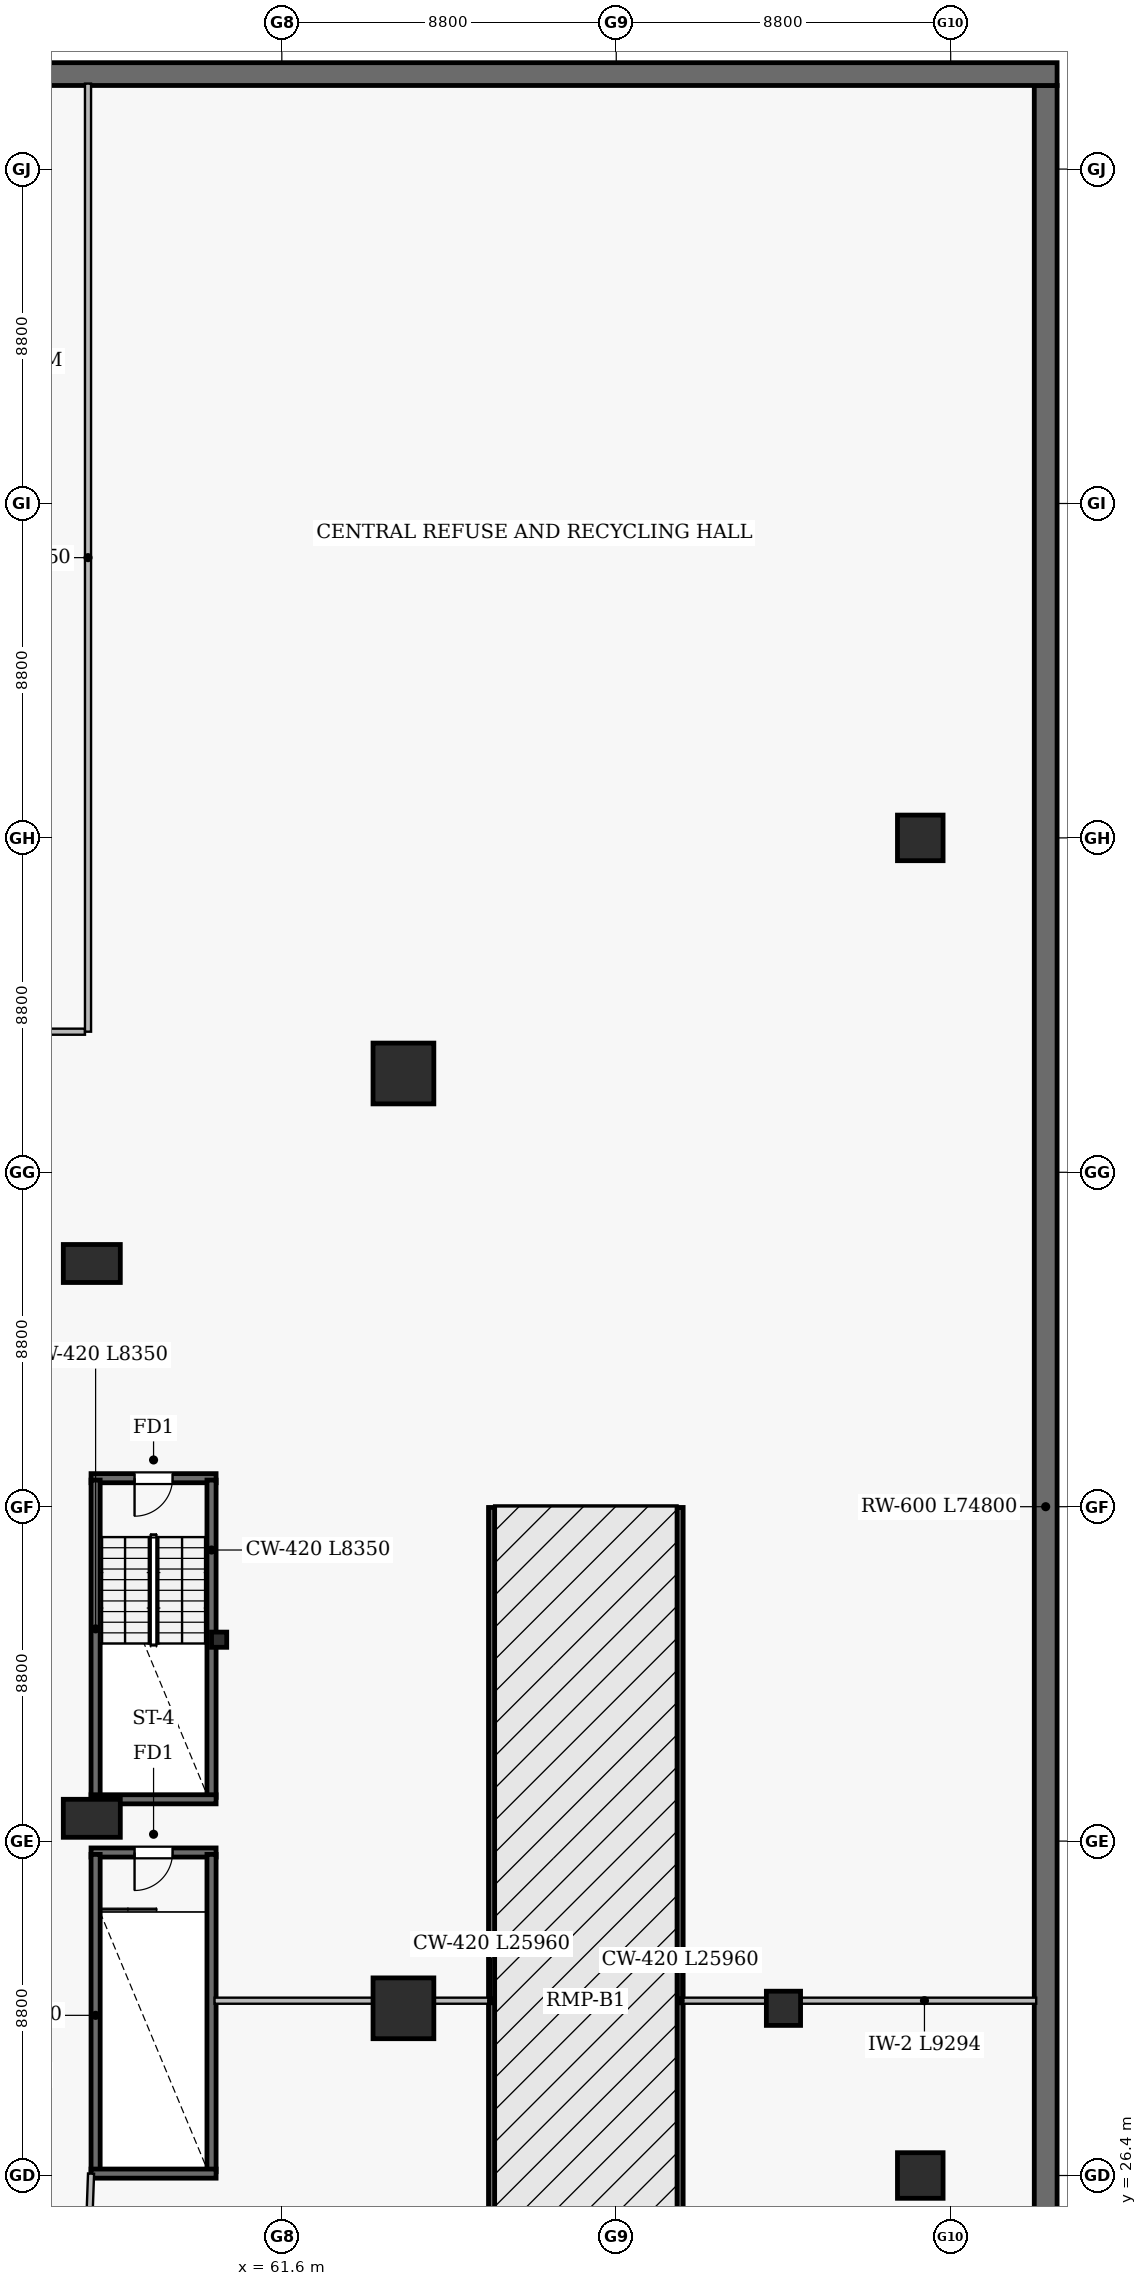
"""IFC4 building model, lengths in metres.
Left out: names, types, materials, properties, quantities, classifications, styles, units other than length and angle.
Written with IfcOpenShell. Run it as: python <this file> out.ifc"""

import sys

from ifc_helpers import new_model, si_unit, direction, frame, frame_2d, origin, origin_2d, place, context, subcontext, project, spatial, rectangle, i_section, extrude, element, fill, save


model = new_model("IFC4")
c1 = context("Model", 3, precision=1e-05, world=origin(), true_north=direction((0.0, 1.0)))
c2 = subcontext(c1, "Body", "Model", "MODEL_VIEW")
j1 = project(units=[si_unit("LENGTHUNIT", "METRE"), si_unit("PLANEANGLEUNIT", "RADIAN")], contexts=[c1])
p1 = place(None, origin())
s1 = spatial("IfcSite", under=j1, at=p1, CompositionType="ELEMENT")
p2 = place(p1, origin())
s2 = spatial("IfcBuilding", under=s1, at=p2, CompositionType="ELEMENT")
p3 = place(p2, frame((0.0, 0.0, -3.9)))
s3 = spatial("IfcBuildingStorey", under=s2, at=p3, CompositionType="ELEMENT", Elevation=-3.9)
for number, where, z_axis, x_axis in (
    (1, (67.12, 18.02, 0.0), (0.0, 0.0, 1.0), (0.0, 1.0, 0.0)),
    (2, (72.08, 18.02, 0.0), (0.0, 0.0, 1.0), (0.0, 1.0, 0.0)),
):
    element("IfcWall", number, at=place(p3, frame(where, z_axis=z_axis, x_axis=x_axis)), inside=s3, PredefinedType="SHEAR", context=c2, shape_type="SweptSolid", body=[
        extrude(rectangle(XDim=25.96, YDim=0.16, at=frame_2d((12.98, 0.0))), origin(), (0.0, 0.0, 1.0), 3.9),
    ])
p4 = place(p3, frame((81.7, 6.6, 0.0), z_axis=(0.0, 0.0, 1.0), x_axis=(0.0, 1.0, 0.0)))
e3 = element("IfcWall", 3, at=p4, inside=s3, PredefinedType="SOLIDWALL", context=c2, shape_type="SweptSolid", body=[
    extrude(rectangle(XDim=74.8, YDim=0.6, at=frame_2d((37.4, 0.0))), origin(), (0.0, 0.0, 1.0), 3.6),
])
p5 = place(p3, frame((82.0, 81.7, 0.0), z_axis=(0.0, 0.0, 1.0), x_axis=(-1.0, 0.0, 0.0)))
e4 = element("IfcWall", 4, at=p5, inside=s3, PredefinedType="SOLIDWALL", context=c2, shape_type="SweptSolid", body=[
    extrude(rectangle(XDim=76.0, YDim=0.6, at=frame_2d((38.0, 0.0))), origin(), (0.0, 0.0, 1.0), 3.6),
])
for number, where, z_axis, x_axis in (
    (5, (56.6, 50.4, 0.0), (0.0, 0.0, 1.0), (1.0, 0.0, 0.0)),
    (6, (56.6, 35.8, 0.0), (0.0, 0.0, 1.0), (1.0, 0.0, 0.0)),
):
    element("IfcColumn", number, at=place(p3, frame(where, z_axis=z_axis, x_axis=x_axis)), inside=s3, PredefinedType="COLUMN", context=c2, shape_type="SweptSolid", body=[
        extrude(rectangle(XDim=1.5, YDim=1.0, at=origin_2d()), origin(), (0.0, 0.0, 1.0), 3.9),
    ])
for number, where, z_axis, x_axis in (
    (7, (64.8, 55.4, 0.0), (0.0, 0.0, 1.0), (1.0, 0.0, 0.0)),
    (8, (64.8, 30.8, 0.0), (0.0, 0.0, 1.0), (1.0, 0.0, 0.0)),
):
    element("IfcColumn", number, at=place(p3, frame(where, z_axis=z_axis, x_axis=x_axis)), inside=s3, PredefinedType="COLUMN", context=c2, shape_type="SweptSolid", body=[
        extrude(rectangle(XDim=1.6, YDim=1.6, at=origin_2d()), origin(), (0.0, 0.0, 1.0), 3.9),
    ])
p6 = place(p3, frame((74.8, 30.8, 0.0), z_axis=(0.0, 0.0, 1.0), x_axis=(1.0, 0.0, 0.0)))
e9 = element("IfcColumn", 9, at=p6, inside=s3, PredefinedType="COLUMN", context=c2, shape_type="SweptSolid", body=[
    extrude(rectangle(XDim=0.9, YDim=0.9, at=origin_2d()), origin(), (0.0, 0.0, 1.0), 3.9),
])
p7 = place(p3, frame((59.95, 40.5, 0.0), z_axis=(0.0, 0.0, 1.0), x_axis=(1.0, 0.0, 0.0)))
e10 = element("IfcColumn", 10, at=p7, inside=s3, PredefinedType="PILASTER", context=c2, shape_type="SweptSolid", body=[
    extrude(i_section(OverallWidth=0.4, OverallDepth=0.4, WebThickness=0.013, FlangeThickness=0.021, FilletRadius=0.022, at=origin_2d()), origin(), (0.0, 0.0, 1.0), 3.9),
])
for number, where, z_axis, x_axis in (
    (11, (78.4, 26.4, 0.0), (0.0, 0.0, 1.0), (1.0, 0.0, 0.0)),
    (12, (78.4, 61.6, 0.0), (0.0, 0.0, 1.0), (1.0, 0.0, 0.0)),
):
    element("IfcColumn", number, at=place(p3, frame(where, z_axis=z_axis, x_axis=x_axis)), inside=s3, PredefinedType="COLUMN", context=c2, shape_type="SweptSolid", body=[
        extrude(rectangle(XDim=1.2, YDim=1.2, at=origin_2d()), origin(), (0.0, 0.0, 1.0), 3.9),
    ])
p8 = place(p3, frame((56.58, 44.75, 0.0), z_axis=(0.0, 0.0, 1.0), x_axis=(1.0, 0.0, 0.0)))
e13 = element("IfcWall", 13, at=p8, inside=s3, PredefinedType="SHEAR", context=c2, shape_type="SweptSolid", body=[
    extrude(rectangle(XDim=3.29, YDim=0.24, at=frame_2d((1.645, 0.0))), origin(), (0.0, 0.0, 1.0), 3.6),
])
p9 = place(p8, frame((1.145, 0.0, 0.0)))
e14 = element("IfcOpeningElement", 14, at=p9, cuts=e13, PredefinedType="OPENING", context=c2, shape_type="SweptSolid", body=[
    extrude(rectangle(XDim=1.0, YDim=2.15, at=frame_2d((0.5, 1.075))), frame((0.0, 0.13, 0.0), z_axis=(0.0, -1.0, 0.0), x_axis=(1.0, 0.0, 0.0)), (0.0, 0.0, 1.0), 0.26),
])
p10 = place(p3, frame((56.58, 34.9, 0.0), z_axis=(0.0, 0.0, 1.0), x_axis=(1.0, 0.0, 0.0)))
e15 = element("IfcWall", 15, at=p10, inside=s3, PredefinedType="SHEAR", context=c2, shape_type="SweptSolid", body=[
    extrude(rectangle(XDim=3.29, YDim=0.24, at=frame_2d((1.645, 0.0))), origin(), (0.0, 0.0, 1.0), 3.6),
])
p11 = place(p10, frame((1.145, 0.0, 0.0)))
e16 = element("IfcOpeningElement", 16, at=p11, cuts=e15, PredefinedType="OPENING", context=c2, shape_type="SweptSolid", body=[
    extrude(rectangle(XDim=1.0, YDim=2.15, at=frame_2d((0.5, 1.075))), frame((0.0, 0.13, 0.0), z_axis=(0.0, -1.0, 0.0), x_axis=(1.0, 0.0, 0.0)), (0.0, 0.0, 1.0), 0.26),
])
for number, where, z_axis, x_axis in (
    (17, (56.7, 36.35, 0.0), (0.0, 0.0, 1.0), (0.0, 1.0, 0.0)),
    (18, (59.75, 36.35, 0.0), (0.0, 0.0, 1.0), (0.0, 1.0, 0.0)),
):
    element("IfcWall", number, at=place(p3, frame(where, z_axis=z_axis, x_axis=x_axis)), inside=s3, PredefinedType="SHEAR", context=c2, shape_type="SweptSolid", body=[
        extrude(rectangle(XDim=8.35, YDim=0.24, at=frame_2d((4.175, 0.0))), origin(), (0.0, 0.0, 1.0), 3.6),
    ])
for number, where, z_axis, x_axis in (
    (19, (56.7, 26.5, 0.0), (0.0, 0.0, 1.0), (0.0, 1.0, 0.0)),
    (20, (59.75, 26.5, 0.0), (0.0, 0.0, 1.0), (0.0, 1.0, 0.0)),
):
    element("IfcWall", number, at=place(p3, frame(where, z_axis=z_axis, x_axis=x_axis)), inside=s3, PredefinedType="SHEAR", context=c2, shape_type="SweptSolid", body=[
        extrude(rectangle(XDim=8.35, YDim=0.24, at=frame_2d((4.175, 0.0))), origin(), (0.0, 0.0, 1.0), 3.6),
    ])
for number, where, z_axis, x_axis in (
    (21, (56.58, 36.3, 0.0), (0.0, 0.0, 1.0), (1.0, 0.0, 0.0)),
    (22, (56.58, 26.45, 0.0), (0.0, 0.0, 1.0), (1.0, 0.0, 0.0)),
):
    element("IfcWall", number, at=place(p3, frame(where, z_axis=z_axis, x_axis=x_axis)), inside=s3, PredefinedType="SHEAR", context=c2, shape_type="SweptSolid", body=[
        extrude(rectangle(XDim=3.29, YDim=0.24, at=frame_2d((1.645, 0.0))), origin(), (0.0, 0.0, 1.0), 3.6),
    ])
p12 = place(p3, frame((56.42, 56.5, 0.0), z_axis=(0.0, 0.0, 1.0), x_axis=(-1.0, 0.0, 0.0)))
e23 = element("IfcWall", 23, at=p12, inside=s3, PredefinedType="SOLIDWALL", context=c2, shape_type="SweptSolid", body=[
    extrude(rectangle(XDim=21.14, YDim=0.16, at=frame_2d((10.57, 0.0))), origin(), (0.0, 0.0, 1.0), 2.938),
])
p13 = place(p12, frame((9.84, 0.0, 0.0)))
e24 = element("IfcOpeningElement", 24, at=p13, cuts=e23, PredefinedType="OPENING", context=c2, shape_type="SweptSolid", body=[
    extrude(rectangle(XDim=1.1, YDim=2.15, at=frame_2d((0.55, 1.075))), frame((0.0, 0.09, 0.0), z_axis=(0.0, -1.0, 0.0), x_axis=(1.0, 0.0, 0.0)), (0.0, 0.0, 1.0), 0.18),
])
p14 = place(p3, frame((56.5, 56.5, 0.0), z_axis=(0.0, 0.0, 1.0), x_axis=(0.0, 1.0, 0.0)))
e25 = element("IfcWall", 25, at=p14, inside=s3, PredefinedType="SOLIDWALL", context=c2, shape_type="SweptSolid", body=[
    extrude(rectangle(XDim=24.95, YDim=0.16, at=frame_2d((12.475, 0.0))), origin(), (0.0, 0.0, 1.0), 2.888),
])
p15 = place(p3, frame((81.45, 31.0, 0.0), z_axis=(0.0, 0.0, 1.0), x_axis=(-1.0, 0.0, 0.0)))
e26 = element("IfcWall", 26, at=p15, inside=s3, PredefinedType="SOLIDWALL", context=c2, shape_type="SweptSolid", body=[
    extrude(rectangle(XDim=9.294, YDim=0.16, at=frame_2d((4.647, 0.0))), origin(), (0.0, 0.0, 1.0), 3.6),
])
p16 = place(p3, frame((67.044, 31.0, 0.0), z_axis=(0.0, 0.0, 1.0), x_axis=(-1.0, 0.0, 0.0)))
e27 = element("IfcWall", 27, at=p16, inside=s3, PredefinedType="SOLIDWALL", context=c2, shape_type="SweptSolid", body=[
    extrude(rectangle(XDim=7.214, YDim=0.16, at=frame_2d((3.607, 0.0))), origin(), (0.0, 0.0, 1.0), 2.888),
])
p17 = place(p3, frame((56.42, 22.0, 0.0), z_axis=(0.0, 0.0, 1.0), x_axis=(0.03596727641, 0.999352968189, 0.0)))
e28 = element("IfcWall", 28, at=p17, inside=s3, PredefinedType="SOLIDWALL", context=c2, shape_type="SweptSolid", body=[
    extrude(rectangle(XDim=4.453, YDim=0.16, at=frame_2d((2.227, 0.0))), origin(), (0.0, 0.0, 1.0), 3.6),
])
p18 = place(p9, frame((1.0, 0.0, 0.0), z_axis=(0.0, 0.0, 1.0), x_axis=(-1.0, 0.0, 0.0)))
e29 = element("IfcDoor", 29, at=p18, inside=s3, OperationType="SINGLE_SWING_LEFT", PredefinedType="DOOR", context=c2, shape_type="SweptSolid", body=[
    extrude(rectangle(XDim=1.0, YDim=2.15, at=frame_2d((0.5, 1.075))), frame((0.0, 0.025, 0.0), z_axis=(0.0, -1.0, 0.0), x_axis=(1.0, 0.0, 0.0)), (0.0, 0.0, 1.0), 0.05),
])
fill(e14, e29)
p19 = place(p11, frame((1.0, 0.0, 0.0), z_axis=(0.0, 0.0, 1.0), x_axis=(-1.0, 0.0, 0.0)))
e30 = element("IfcDoor", 30, at=p19, inside=s3, OperationType="SINGLE_SWING_LEFT", PredefinedType="DOOR", context=c2, shape_type="SweptSolid", body=[
    extrude(rectangle(XDim=1.0, YDim=2.15, at=frame_2d((0.5, 1.075))), frame((0.0, 0.025, 0.0), z_axis=(0.0, -1.0, 0.0), x_axis=(1.0, 0.0, 0.0)), (0.0, 0.0, 1.0), 0.05),
])
fill(e16, e30)
save(model, sys.argv[1])
